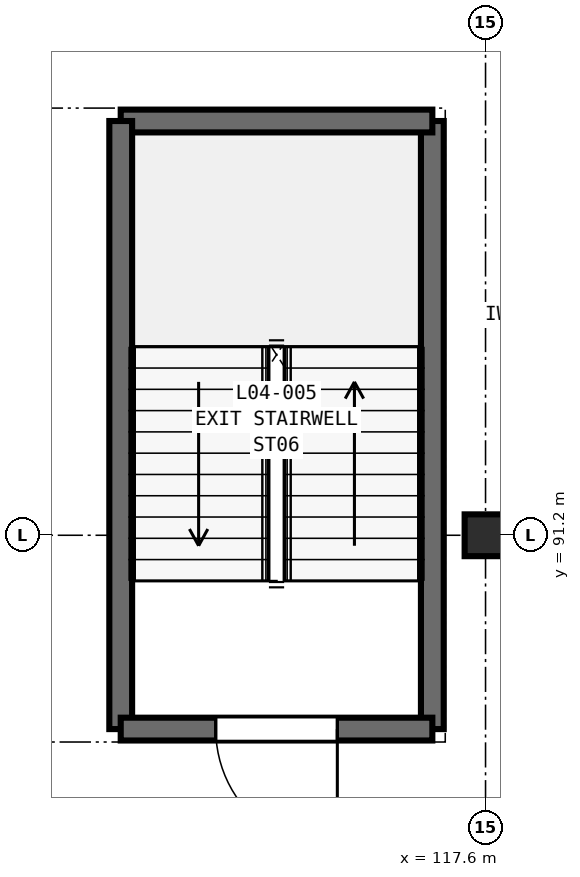
"""IFC4 building model, lengths in metres.
Left out: names, types, materials, properties, quantities, classifications, styles, units other than length and angle.
Written with IfcOpenShell. Run it as: python <this file> out.ifc"""

import sys

from ifc_helpers import new_model, si_unit, direction, frame, frame_2d, origin, origin_2d, place, context, subcontext, project, spatial, rectangle, extrude, element, fill, save


model = new_model("IFC4")
c1 = context("Model", 3, precision=1e-05, world=origin(), true_north=direction((0.0, 1.0)))
c2 = subcontext(c1, "Body", "Model", "MODEL_VIEW")
j1 = project(units=[si_unit("LENGTHUNIT", "METRE"), si_unit("PLANEANGLEUNIT", "RADIAN")], contexts=[c1])
p1 = place(None, origin())
s1 = spatial("IfcSite", under=j1, at=p1, CompositionType="ELEMENT")
p2 = place(p1, origin())
s2 = spatial("IfcBuilding", under=s1, at=p2, CompositionType="ELEMENT")
p3 = place(p2, frame((0.0, 0.0, 20.4)))
s3 = spatial("IfcBuildingStorey", under=s2, at=p3, CompositionType="ELEMENT", Elevation=20.4)
p4 = place(p3, frame((117.6, 91.2, 0.0), z_axis=(0.0, 0.0, 1.0), x_axis=(1.0, 0.0, 0.0)))
e1 = element("IfcColumn", 1, at=p4, inside=s3, PredefinedType="COLUMN", context=c2, shape_type="SweptSolid", body=[
    extrude(rectangle(XDim=0.55, YDim=0.55, at=origin_2d()), origin(), (0.0, 0.0, 1.0), 4.2),
])
p5 = place(p3, frame((116.9, 88.65, 0.0), z_axis=(0.0, 0.0, 1.0), x_axis=(0.0, 1.0, 0.0)))
e2 = element("IfcWall", 2, at=p5, inside=s3, PredefinedType="SHEAR", context=c2, shape_type="SweptSolid", body=[
    extrude(rectangle(XDim=8.0, YDim=0.3, at=frame_2d((4.0, 0.0))), origin(), (0.0, 0.0, 1.0), 4.2),
])
p6 = place(p3, frame((116.9, 96.65, 0.0), z_axis=(0.0, 0.0, 1.0), x_axis=(-1.0, 0.0, 0.0)))
e3 = element("IfcWall", 3, at=p6, inside=s3, PredefinedType="SHEAR", context=c2, shape_type="SweptSolid", body=[
    extrude(rectangle(XDim=4.1, YDim=0.3, at=frame_2d((2.05, 0.0))), origin(), (0.0, 0.0, 1.0), 4.2),
])
p7 = place(p3, frame((112.8, 96.65, 0.0), z_axis=(0.0, 0.0, 1.0), x_axis=(0.0, -1.0, 0.0)))
e4 = element("IfcWall", 4, at=p7, inside=s3, PredefinedType="SHEAR", context=c2, shape_type="SweptSolid", body=[
    extrude(rectangle(XDim=8.0, YDim=0.3, at=frame_2d((4.0, 0.0))), origin(), (0.0, 0.0, 1.0), 4.2),
])
p8 = place(p3, frame((112.8, 88.65, 0.0), z_axis=(0.0, 0.0, 1.0), x_axis=(1.0, 0.0, 0.0)))
e5 = element("IfcWall", 5, at=p8, inside=s3, PredefinedType="SHEAR", context=c2, shape_type="SweptSolid", body=[
    extrude(rectangle(XDim=4.1, YDim=0.3, at=frame_2d((2.05, 0.0))), origin(), (0.0, 0.0, 1.0), 4.2),
])
p9 = place(p8, frame((1.25, 0.0, 0.0)))
e6 = element("IfcOpeningElement", 6, at=p9, cuts=e5, PredefinedType="OPENING", context=c2, shape_type="SweptSolid", body=[
    extrude(rectangle(XDim=1.6, YDim=2.25, at=frame_2d((0.8, 1.125))), frame((0.0, 0.16, 0.0), z_axis=(0.0, -1.0, 0.0), x_axis=(1.0, 0.0, 0.0)), (0.0, 0.0, 1.0), 0.32),
])
p10 = place(p9, frame((1.6, 0.0, 0.0), z_axis=(0.0, 0.0, 1.0), x_axis=(-1.0, 0.0, 0.0)))
e7 = element("IfcDoor", 7, at=p10, inside=s3, OperationType="SINGLE_SWING_LEFT", PredefinedType="DOOR", context=c2, shape_type="SweptSolid", body=[
    extrude(rectangle(XDim=1.6, YDim=2.25, at=frame_2d((0.8, 1.125))), frame((0.0, 0.025, 0.0), z_axis=(0.0, -1.0, 0.0), x_axis=(1.0, 0.0, 0.0)), (0.0, 0.0, 1.0), 0.05),
])
fill(e6, e7)
save(model, sys.argv[1])
